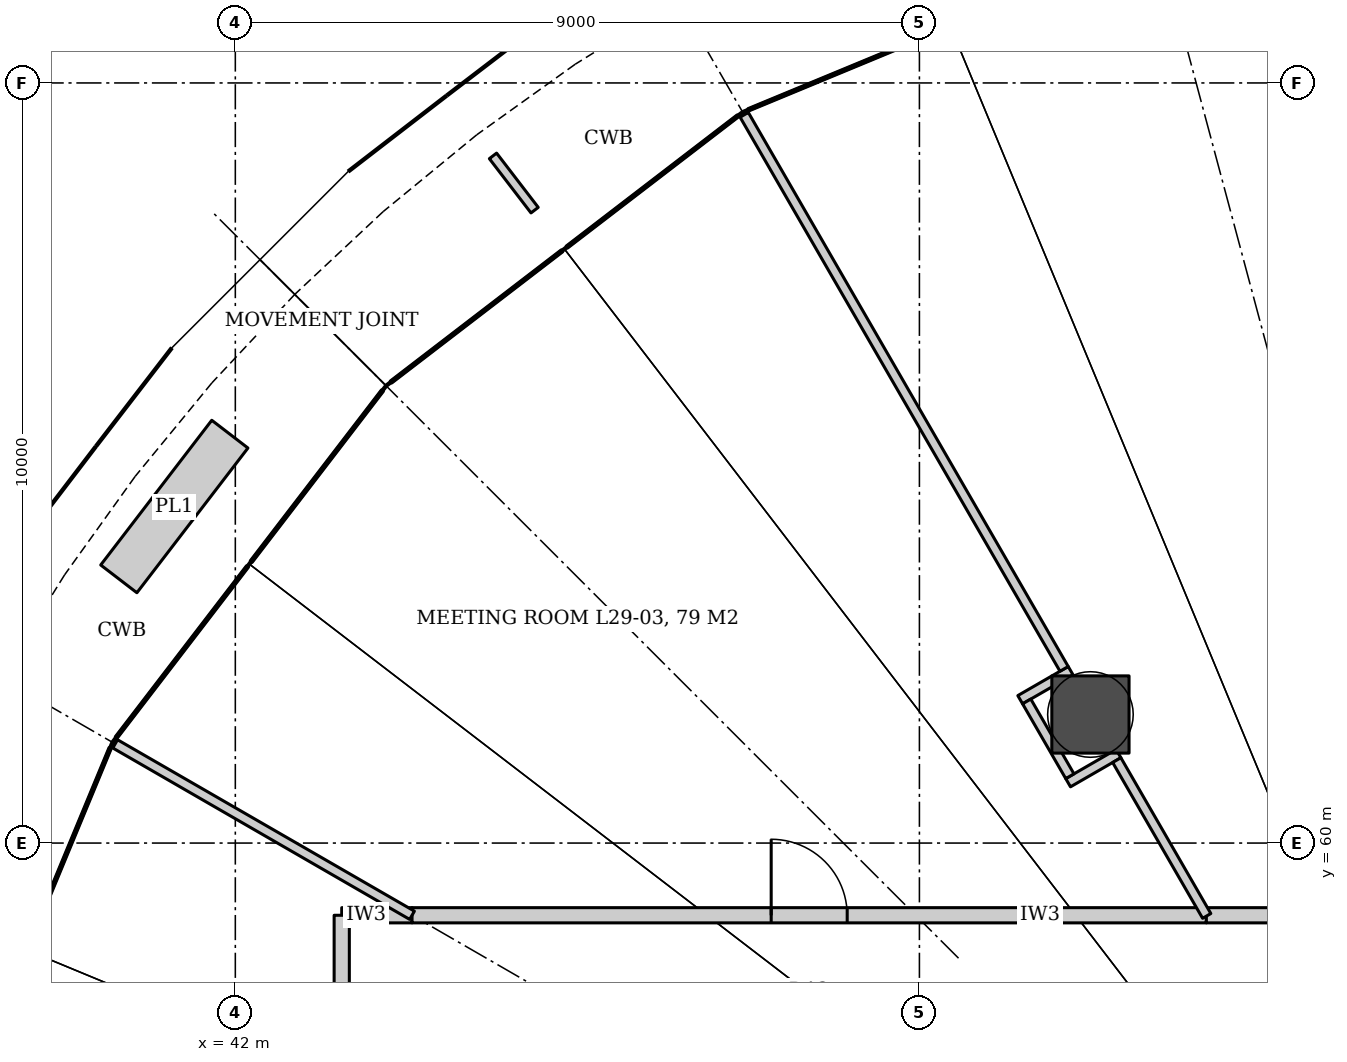
"""IFC4 building model, lengths in metres.
Left out: names, types, materials, properties, quantities, classifications, styles, units other than length and angle.
Written with IfcOpenShell. Run it as: python <this file> out.ifc"""

import sys

from ifc_helpers import new_model, si_unit, direction, frame, frame_2d, origin, origin_2d, place, context, subcontext, project, spatial, rectangle, hollow_circle, extrude, element, fill, save


model = new_model("IFC4")
c1 = context("Model", 3, precision=1e-05, world=origin(), true_north=direction((0.0, 1.0)))
c2 = subcontext(c1, "Body", "Model", "MODEL_VIEW")
j1 = project(units=[si_unit("LENGTHUNIT", "METRE"), si_unit("PLANEANGLEUNIT", "RADIAN")], contexts=[c1])
p1 = place(None, origin())
s1 = spatial("IfcSite", under=j1, at=p1, CompositionType="ELEMENT")
p2 = place(p1, origin())
s2 = spatial("IfcBuilding", under=s1, at=p2, CompositionType="ELEMENT")
p3 = place(p2, frame((0.0, 0.0, 122.6)))
s3 = spatial("IfcBuildingStorey", under=s2, at=p3, CompositionType="ELEMENT", Elevation=122.6)
p4 = place(p3, frame((53.25, 61.691, 0.0), z_axis=(0.0, 0.0, 1.0), x_axis=(1.0, 0.0, 0.0)))
e1 = element("IfcColumn", 1, at=p4, inside=s3, PredefinedType="COLUMN", context=c2, shape_type="SweptSolid", body=[
    extrude(hollow_circle(Radius=0.508, WallThickness=0.05, at=origin_2d()), origin(), (0.0, 0.0, 1.0), 4.2),
])
p5 = place(p3, frame((43.4, 59.05, 0.0), z_axis=(0.0, 0.0, 1.0), x_axis=(1.0, 0.0, 0.0)))
e2 = element("IfcWall", 2, at=p5, inside=s3, PredefinedType="PARTITIONING", context=c2, shape_type="SweptSolid", body=[
    extrude(rectangle(XDim=0.925, YDim=0.2, at=frame_2d((0.462, 0.0))), origin(), (0.0, 0.0, 1.0), 3.04),
])
p6 = place(p3, frame((44.325, 59.05, 0.0), z_axis=(0.0, 0.0, 1.0), x_axis=(1.0, 0.0, 0.0)))
e3 = element("IfcWall", 3, at=p6, inside=s3, PredefinedType="PARTITIONING", context=c2, shape_type="SweptSolid", body=[
    extrude(rectangle(XDim=10.45, YDim=0.2, at=frame_2d((5.225, 0.0))), origin(), (0.0, 0.0, 1.0), 3.02),
])
p7 = place(p6, frame((4.725, 0.0, 0.0)))
e4 = element("IfcOpeningElement", 4, at=p7, cuts=e3, PredefinedType="OPENING", context=c2, shape_type="SweptSolid", body=[
    extrude(rectangle(XDim=1.0, YDim=2.4, at=frame_2d((0.5, 1.2))), frame((0.0, 0.11, 0.0), z_axis=(0.0, -1.0, 0.0), x_axis=(1.0, 0.0, 0.0)), (0.0, 0.0, 1.0), 0.22),
])
p8 = place(p3, frame((54.775, 59.05, 0.0), z_axis=(0.0, 0.0, 1.0), x_axis=(1.0, 0.0, 0.0)))
e5 = element("IfcWall", 5, at=p8, inside=s3, PredefinedType="PARTITIONING", context=c2, shape_type="SweptSolid", body=[
    extrude(rectangle(XDim=21.825, YDim=0.2, at=frame_2d((10.913, 0.0))), origin(), (0.0, 0.0, 1.0), 3.02),
])
p9 = place(p8, frame((9.913, 0.0, 0.0)))
e6 = element("IfcOpeningElement", 6, at=p9, cuts=e5, PredefinedType="OPENING", context=c2, shape_type="SweptSolid", body=[
    extrude(rectangle(XDim=2.0, YDim=2.1, at=frame_2d((1.0, 1.05))), frame((0.0, 0.11, 0.0), z_axis=(0.0, -1.0, 0.0), x_axis=(1.0, 0.0, 0.0)), (0.0, 0.0, 1.0), 0.22),
])
p10 = place(p3, frame((43.4, 54.448, 0.0), z_axis=(0.0, 0.0, 1.0), x_axis=(0.0, 1.0, 0.0)))
e7 = element("IfcWall", 7, at=p10, inside=s3, PredefinedType="PARTITIONING", context=c2, shape_type="SweptSolid", body=[
    extrude(rectangle(XDim=4.602, YDim=0.2, at=frame_2d((2.301, 0.0))), origin(), (0.0, 0.0, 1.0), 3.04),
])
p11 = place(p10, frame((1.851, 0.0, 0.0)))
e8 = element("IfcOpeningElement", 8, at=p11, cuts=e7, PredefinedType="OPENING", context=c2, shape_type="SweptSolid", body=[
    extrude(rectangle(XDim=0.9, YDim=2.4, at=frame_2d((0.45, 1.2))), frame((0.0, 0.11, 0.0), z_axis=(0.0, -1.0, 0.0), x_axis=(1.0, 0.0, 0.0)), (0.0, 0.0, 1.0), 0.22),
])
for number, where, z_axis, x_axis in (
    (9, (53.619, 61.177, 0.0), (0.0, 0.0, 1.0), (-0.866, -0.5, 0.0)),
    (10, (52.989, 62.269, 0.0), (0.0, 0.0, 1.0), (-0.866, -0.5, 0.0)),
):
    element("IfcWall", number, at=place(p3, frame(where, z_axis=z_axis, x_axis=x_axis)), inside=s3, PredefinedType="PARTITIONING", context=c2, shape_type="SweptSolid", body=[
        extrude(rectangle(XDim=0.766, YDim=0.125, at=frame_2d((0.383, 0.0))), origin(), (0.0, 0.0, 1.0), 3.02),
    ])
p12 = place(p3, frame((52.979, 60.879, 0.0), z_axis=(0.0, 0.0, 1.0), x_axis=(-0.499883687939, 0.866092546171, 0.0)))
e11 = element("IfcWall", 11, at=p12, inside=s3, PredefinedType="PARTITIONING", context=c2, shape_type="SweptSolid", body=[
    extrude(rectangle(XDim=1.136, YDim=0.125, at=frame_2d((0.568, 0.0))), origin(), (0.0, 0.0, 1.0), 3.02),
])
p13 = place(p3, frame((54.78, 59.041, 0.0), z_axis=(0.0, 0.0, 1.0), x_axis=(-0.499999210213, 0.866025859768, 0.0)))
e12 = element("IfcWall", 12, at=p13, inside=s3, PredefinedType="PARTITIONING", context=c2, shape_type="SweptSolid", body=[
    extrude(rectangle(XDim=2.367, YDim=0.125, at=frame_2d((1.184, 0.0))), origin(), (0.0, 0.0, 1.0), 3.04),
])
p14 = place(p3, frame((52.904, 62.292, 0.0), z_axis=(0.0, 0.0, 1.0), x_axis=(-0.500002013721, 0.866024241159, 0.0)))
e13 = element("IfcWall", 13, at=p14, inside=s3, PredefinedType="PARTITIONING", context=c2, shape_type="SweptSolid", body=[
    extrude(rectangle(XDim=8.517, YDim=0.125, at=frame_2d((4.259, 0.0))), origin(), (0.0, 0.0, 1.0), 3.04),
])
p15 = place(p3, frame((44.325, 59.05, 0.0), z_axis=(0.0, 0.0, 1.0), x_axis=(-0.866034781647, 0.499983756713, 0.0)))
e14 = element("IfcWall", 14, at=p15, inside=s3, PredefinedType="PARTITIONING", context=c2, shape_type="SweptSolid", body=[
    extrude(rectangle(XDim=4.61, YDim=0.125, at=frame_2d((2.305, 0.0))), origin(), (0.0, 0.0, 1.0), 3.04),
])
p16 = place(p7, origin())
e15 = element("IfcDoor", 15, at=p16, inside=s3, OperationType="SINGLE_SWING_LEFT", PredefinedType="DOOR", context=c2, shape_type="SweptSolid", body=[
    extrude(rectangle(XDim=1.0, YDim=2.4, at=frame_2d((0.5, 1.2))), frame((0.0, 0.025, 0.0), z_axis=(0.0, -1.0, 0.0), x_axis=(1.0, 0.0, 0.0)), (0.0, 0.0, 1.0), 0.05),
])
fill(e4, e15)
save(model, sys.argv[1])
